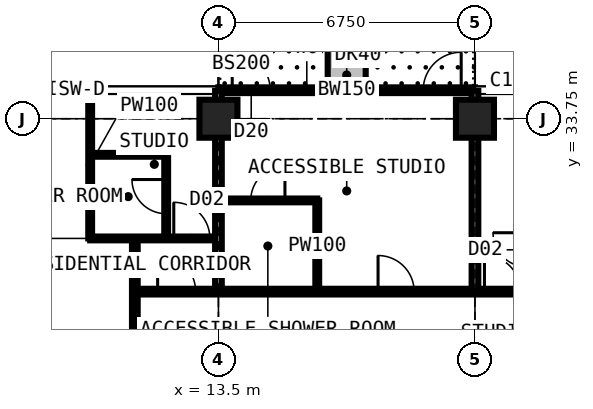
"""IFC4 building model, lengths in metres.
Left out: names, types, materials, properties, quantities, classifications, styles, units other than length and angle.
Written with IfcOpenShell. Run it as: python <this file> out.ifc"""

import sys

from ifc_helpers import new_model, si_unit, direction, frame, frame_2d, origin, origin_2d, place, context, subcontext, project, spatial, rectangle, extrude, element, fill, save


model = new_model("IFC4")
c1 = context("Model", 3, precision=1e-05, world=origin(), true_north=direction((0.0, 1.0)))
c2 = subcontext(c1, "Body", "Model", "MODEL_VIEW")
j1 = project(units=[si_unit("LENGTHUNIT", "METRE"), si_unit("PLANEANGLEUNIT", "RADIAN")], contexts=[c1])
p1 = place(None, origin())
s1 = spatial("IfcSite", under=j1, at=p1, CompositionType="ELEMENT")
p2 = place(p1, origin())
s2 = spatial("IfcBuilding", under=s1, at=p2, CompositionType="ELEMENT")
p3 = place(p2, frame((0.0, 0.0, 240.3)))
s3 = spatial("IfcBuildingStorey", under=s2, at=p3, CompositionType="ELEMENT", Elevation=240.3)
for number, where, z_axis, x_axis in (
    (1, (13.5, 33.75, 0.0), (0.0, 0.0, 1.0), (1.0, 0.0, 0.0)),
    (2, (20.25, 33.75, 0.0), (0.0, 0.0, 1.0), (1.0, 0.0, 0.0)),
):
    element("IfcColumn", number, at=place(p3, frame(where, z_axis=z_axis, x_axis=x_axis)), inside=s3, PredefinedType="COLUMN", context=c2, shape_type="SweptSolid", body=[
        extrude(rectangle(XDim=1.0, YDim=1.0, at=origin_2d()), origin(), (0.0, 0.0, 1.0), 3.6),
    ])
p4 = place(p3, frame((13.5, 34.5, 0.0), z_axis=(0.0, 0.0, 1.0), x_axis=(1.0, 0.0, 0.0)))
e3 = element("IfcWall", 3, at=p4, inside=s3, PredefinedType="SOLIDWALL", context=c2, shape_type="SweptSolid", body=[
    extrude(rectangle(XDim=6.75, YDim=0.15, at=frame_2d((3.375, 0.0))), origin(), (0.0, 0.0, 1.0), 3.375),
])
p5 = place(p4, frame((0.363, 0.0, 0.0)))
e4 = element("IfcOpeningElement", 4, at=p5, cuts=e3, PredefinedType="OPENING", context=c2, shape_type="SweptSolid", body=[
    extrude(rectangle(XDim=1.0, YDim=2.2, at=frame_2d((0.5, 1.1))), frame((0.0, 0.085, 0.0), z_axis=(0.0, -1.0, 0.0), x_axis=(1.0, 0.0, 0.0)), (0.0, 0.0, 1.0), 0.17),
])
p6 = place(p4, frame((1.725, 0.0, 0.9)))
e5 = element("IfcOpeningElement", 5, at=p6, cuts=e3, PredefinedType="OPENING", context=c2, shape_type="SweptSolid", body=[
    extrude(rectangle(XDim=1.2, YDim=1.8, at=frame_2d((0.6, 0.9))), frame((0.0, 0.085, 0.0), z_axis=(0.0, -1.0, 0.0), x_axis=(1.0, 0.0, 0.0)), (0.0, 0.0, 1.0), 0.17),
])
p7 = place(p4, frame((5.387, 0.0, 0.0)))
e6 = element("IfcOpeningElement", 6, at=p7, cuts=e3, PredefinedType="OPENING", context=c2, shape_type="SweptSolid", body=[
    extrude(rectangle(XDim=1.0, YDim=2.2, at=frame_2d((0.5, 1.1))), frame((0.0, 0.085, 0.0), z_axis=(0.0, -1.0, 0.0), x_axis=(1.0, 0.0, 0.0)), (0.0, 0.0, 1.0), 0.17),
])
p8 = place(p4, frame((3.825, 0.0, 0.9)))
e7 = element("IfcOpeningElement", 7, at=p8, cuts=e3, PredefinedType="OPENING", context=c2, shape_type="SweptSolid", body=[
    extrude(rectangle(XDim=1.2, YDim=1.8, at=frame_2d((0.6, 0.9))), frame((0.0, 0.085, 0.0), z_axis=(0.0, -1.0, 0.0), x_axis=(1.0, 0.0, 0.0)), (0.0, 0.0, 1.0), 0.17),
])
p9 = place(p3, frame((16.875, 34.6, 0.0), z_axis=(0.0, 0.0, 1.0), x_axis=(0.0, 1.0, 0.0)))
e8 = element("IfcWall", 8, at=p9, inside=s3, PredefinedType="USERDEFINED", context=c2, shape_type="SweptSolid", body=[
    extrude(rectangle(XDim=2.2, YDim=1.0, at=frame_2d((1.1, 0.0))), origin(), (0.0, 0.0, 1.0), 0.9),
])
p10 = place(p3, frame((10.125, 30.6, 0.0), z_axis=(0.0, 0.0, 1.0), x_axis=(0.0, 1.0, 0.0)))
e9 = element("IfcWall", 9, at=p10, inside=s3, PredefinedType="PARTITIONING", context=c2, shape_type="SweptSolid", body=[
    extrude(rectangle(XDim=3.884, YDim=0.1, at=frame_2d((1.942, 0.0))), origin(), (0.0, 0.0, 1.0), 3.375),
])
p11 = place(p3, frame((10.125, 30.6, 0.0), z_axis=(0.0, 0.0, 1.0), x_axis=(1.0, 0.0, 0.0)))
e10 = element("IfcWall", 10, at=p11, inside=s3, PredefinedType="PARTITIONING", context=c2, shape_type="SweptSolid", body=[
    extrude(rectangle(XDim=3.375, YDim=0.1, at=frame_2d((1.688, 0.0))), origin(), (0.0, 0.0, 1.0), 3.375),
])
p12 = place(p11, frame((2.2, 0.0, 0.0)))
e11 = element("IfcOpeningElement", 11, at=p12, cuts=e10, PredefinedType="OPENING", context=c2, shape_type="SweptSolid", body=[
    extrude(rectangle(XDim=0.95, YDim=2.2, at=frame_2d((0.475, 1.1))), frame((0.0, 0.06, 0.0), z_axis=(0.0, -1.0, 0.0), x_axis=(1.0, 0.0, 0.0)), (0.0, 0.0, 1.0), 0.12),
])
p13 = place(p3, frame((10.125, 32.8, 0.0), z_axis=(0.0, 0.0, 1.0), x_axis=(1.0, 0.0, 0.0)))
e12 = element("IfcWall", 12, at=p13, inside=s3, PredefinedType="PARTITIONING", context=c2, shape_type="SweptSolid", body=[
    extrude(rectangle(XDim=2.0, YDim=0.1, at=frame_2d((1.0, 0.0))), origin(), (0.0, 0.0, 1.0), 3.375),
])
p14 = place(p3, frame((11.3, 11.3, 0.0), z_axis=(0.0, 0.0, 1.0), x_axis=(0.0, 1.0, 0.0)))
e13 = element("IfcWall", 13, at=p14, inside=s3, PredefinedType="PARTITIONING", context=c2, shape_type="SweptSolid", body=[
    extrude(rectangle(XDim=19.3, YDim=0.15, at=frame_2d((9.65, 0.0))), origin(), (0.0, 0.0, 1.0), 3.375),
])
p15 = place(p14, frame((13.525, 0.0, 0.0)))
e14 = element("IfcOpeningElement", 14, at=p15, cuts=e13, PredefinedType="OPENING", context=c2, shape_type="SweptSolid", body=[
    extrude(rectangle(XDim=1.0, YDim=2.2, at=frame_2d((0.5, 1.1))), frame((0.0, 0.085, 0.0), z_axis=(0.0, -1.0, 0.0), x_axis=(1.0, 0.0, 0.0)), (0.0, 0.0, 1.0), 0.17),
])
p16 = place(p14, frame((10.438, 0.0, 0.0)))
e15 = element("IfcOpeningElement", 15, at=p16, cuts=e13, PredefinedType="OPENING", context=c2, shape_type="SweptSolid", body=[
    extrude(rectangle(XDim=1.0, YDim=2.2, at=frame_2d((0.5, 1.1))), frame((0.0, 0.085, 0.0), z_axis=(0.0, -1.0, 0.0), x_axis=(1.0, 0.0, 0.0)), (0.0, 0.0, 1.0), 0.17),
])
p17 = place(p3, frame((11.3, 29.2, 0.0), z_axis=(0.0, 0.0, 1.0), x_axis=(1.0, 0.0, 0.0)))
e16 = element("IfcWall", 16, at=p17, inside=s3, PredefinedType="PARTITIONING", context=c2, shape_type="SweptSolid", body=[
    extrude(rectangle(XDim=19.809, YDim=0.15, at=frame_2d((9.904, 0.0))), origin(), (0.0, 0.0, 1.0), 3.375),
])
p18 = place(p17, frame((14.625, 0.0, 0.0)))
e17 = element("IfcOpeningElement", 17, at=p18, cuts=e16, PredefinedType="OPENING", context=c2, shape_type="SweptSolid", body=[
    extrude(rectangle(XDim=1.0, YDim=2.2, at=frame_2d((0.5, 1.1))), frame((0.0, 0.085, 0.0), z_axis=(0.0, -1.0, 0.0), x_axis=(1.0, 0.0, 0.0)), (0.0, 0.0, 1.0), 0.17),
])
p19 = place(p17, frame((6.4, 0.0, 0.0)))
e18 = element("IfcOpeningElement", 18, at=p19, cuts=e16, PredefinedType="OPENING", context=c2, shape_type="SweptSolid", body=[
    extrude(rectangle(XDim=0.95, YDim=2.2, at=frame_2d((0.475, 1.1))), frame((0.0, 0.085, 0.0), z_axis=(0.0, -1.0, 0.0), x_axis=(1.0, 0.0, 0.0)), (0.0, 0.0, 1.0), 0.17),
])
p20 = place(p17, frame((9.2, 0.0, 0.0)))
e19 = element("IfcOpeningElement", 19, at=p20, cuts=e16, PredefinedType="OPENING", context=c2, shape_type="SweptSolid", body=[
    extrude(rectangle(XDim=0.95, YDim=2.2, at=frame_2d((0.475, 1.1))), frame((0.0, 0.085, 0.0), z_axis=(0.0, -1.0, 0.0), x_axis=(1.0, 0.0, 0.0)), (0.0, 0.0, 1.0), 0.17),
])
p21 = place(p17, frame((0.6, 0.0, 0.0)))
e20 = element("IfcOpeningElement", 20, at=p21, cuts=e16, PredefinedType="OPENING", context=c2, shape_type="SweptSolid", body=[
    extrude(rectangle(XDim=1.0, YDim=2.2, at=frame_2d((0.5, 1.1))), frame((0.0, 0.085, 0.0), z_axis=(0.0, -1.0, 0.0), x_axis=(1.0, 0.0, 0.0)), (0.0, 0.0, 1.0), 0.17),
])
p22 = place(p3, frame((12.125, 30.6, 0.0), z_axis=(0.0, 0.0, 1.0), x_axis=(0.0, 1.0, 0.0)))
e21 = element("IfcWall", 21, at=p22, inside=s3, PredefinedType="PARTITIONING", context=c2, shape_type="SweptSolid", body=[
    extrude(rectangle(XDim=2.2, YDim=0.1, at=frame_2d((1.1, 0.0))), origin(), (0.0, 0.0, 1.0), 3.375),
])
p23 = place(p22, frame((0.65, 0.0, 0.0)))
e22 = element("IfcOpeningElement", 22, at=p23, cuts=e21, PredefinedType="OPENING", context=c2, shape_type="SweptSolid", body=[
    extrude(rectangle(XDim=0.9, YDim=2.2, at=frame_2d((0.45, 1.1))), frame((0.0, 0.06, 0.0), z_axis=(0.0, -1.0, 0.0), x_axis=(1.0, 0.0, 0.0)), (0.0, 0.0, 1.0), 0.12),
])
p24 = place(p3, frame((13.5, 29.2, 0.0), z_axis=(0.0, 0.0, 1.0), x_axis=(0.0, 1.0, 0.0)))
e23 = element("IfcWall", 23, at=p24, inside=s3, PredefinedType="PARTITIONING", context=c2, shape_type="SweptSolid", body=[
    extrude(rectangle(XDim=5.284, YDim=0.175, at=frame_2d((2.642, 0.0))), origin(), (0.0, 0.0, 1.0), 2.877),
])
p25 = place(p3, frame((13.5, 31.6, 0.0), z_axis=(0.0, 0.0, 1.0), x_axis=(1.0, 0.0, 0.0)))
e24 = element("IfcWall", 24, at=p25, inside=s3, PredefinedType="PARTITIONING", context=c2, shape_type="SweptSolid", body=[
    extrude(rectangle(XDim=2.6, YDim=0.1, at=frame_2d((1.3, 0.0))), origin(), (0.0, 0.0, 1.0), 3.375),
])
p26 = place(p25, frame((0.85, 0.0, 0.0)))
e25 = element("IfcOpeningElement", 25, at=p26, cuts=e24, PredefinedType="OPENING", context=c2, shape_type="SweptSolid", body=[
    extrude(rectangle(XDim=0.9, YDim=2.2, at=frame_2d((0.45, 1.1))), frame((0.0, 0.06, 0.0), z_axis=(0.0, -1.0, 0.0), x_axis=(1.0, 0.0, 0.0)), (0.0, 0.0, 1.0), 0.12),
])
p27 = place(p3, frame((16.1, 29.2, 0.0), z_axis=(0.0, 0.0, 1.0), x_axis=(0.0, 1.0, 0.0)))
e26 = element("IfcWall", 26, at=p27, inside=s3, PredefinedType="PARTITIONING", context=c2, shape_type="SweptSolid", body=[
    extrude(rectangle(XDim=2.4, YDim=0.1, at=frame_2d((1.2, 0.0))), origin(), (0.0, 0.0, 1.0), 3.375),
])
p28 = place(p3, frame((20.25, 29.2, 0.0), z_axis=(0.0, 0.0, 1.0), x_axis=(0.0, 1.0, 0.0)))
e27 = element("IfcWall", 27, at=p28, inside=s3, PredefinedType="PARTITIONING", context=c2, shape_type="SweptSolid", body=[
    extrude(rectangle(XDim=5.284, YDim=0.175, at=frame_2d((2.642, 0.0))), origin(), (0.0, 0.0, 1.0), 2.877),
])
p29 = place(p5, origin())
e28 = element("IfcDoor", 28, at=p29, inside=s3, OperationType="SINGLE_SWING_LEFT", PredefinedType="DOOR", context=c2, shape_type="SweptSolid", body=[
    extrude(rectangle(XDim=1.0, YDim=2.2, at=frame_2d((0.5, 1.1))), frame((0.0, 0.025, 0.0), z_axis=(0.0, -1.0, 0.0), x_axis=(1.0, 0.0, 0.0)), (0.0, 0.0, 1.0), 0.05),
])
fill(e4, e28)
p30 = place(p6, origin())
e29 = element("IfcWindow", 29, at=p30, inside=s3, PartitioningType="SINGLE_PANEL", PredefinedType="WINDOW", context=c2, shape_type="SweptSolid", body=[
    extrude(rectangle(XDim=1.2, YDim=1.8, at=frame_2d((0.6, 0.9))), frame((0.0, 0.03, 0.0), z_axis=(0.0, -1.0, 0.0), x_axis=(1.0, 0.0, 0.0)), (0.0, 0.0, 1.0), 0.06),
])
fill(e5, e29)
p31 = place(p7, origin())
e30 = element("IfcDoor", 30, at=p31, inside=s3, OperationType="SINGLE_SWING_RIGHT", PredefinedType="DOOR", context=c2, shape_type="SweptSolid", body=[
    extrude(rectangle(XDim=1.0, YDim=2.2, at=frame_2d((0.5, 1.1))), frame((0.0, 0.025, 0.0), z_axis=(0.0, -1.0, 0.0), x_axis=(1.0, 0.0, 0.0)), (0.0, 0.0, 1.0), 0.05),
])
fill(e6, e30)
p32 = place(p8, origin())
e31 = element("IfcWindow", 31, at=p32, inside=s3, PartitioningType="SINGLE_PANEL", PredefinedType="WINDOW", context=c2, shape_type="SweptSolid", body=[
    extrude(rectangle(XDim=1.2, YDim=1.8, at=frame_2d((0.6, 0.9))), frame((0.0, 0.03, 0.0), z_axis=(0.0, -1.0, 0.0), x_axis=(1.0, 0.0, 0.0)), (0.0, 0.0, 1.0), 0.06),
])
fill(e7, e31)
p33 = place(p19, origin())
e32 = element("IfcDoor", 32, at=p33, inside=s3, OperationType="SINGLE_SWING_LEFT", PredefinedType="DOOR", context=c2, shape_type="SweptSolid", body=[
    extrude(rectangle(XDim=0.95, YDim=2.2, at=frame_2d((0.475, 1.1))), frame((0.0, 0.025, 0.0), z_axis=(0.0, -1.0, 0.0), x_axis=(1.0, 0.0, 0.0)), (0.0, 0.0, 1.0), 0.05),
])
fill(e18, e32)
p34 = place(p26, origin())
e33 = element("IfcDoor", 33, at=p34, inside=s3, OperationType="SINGLE_SWING_RIGHT", PredefinedType="DOOR", context=c2, shape_type="SweptSolid", body=[
    extrude(rectangle(XDim=0.9, YDim=2.2, at=frame_2d((0.45, 1.1))), frame((0.0, 0.025, 0.0), z_axis=(0.0, -1.0, 0.0), x_axis=(1.0, 0.0, 0.0)), (0.0, 0.0, 1.0), 0.05),
])
fill(e25, e33)
p35 = place(p12, origin())
e34 = element("IfcDoor", 34, at=p35, inside=s3, OperationType="SINGLE_SWING_LEFT", PredefinedType="DOOR", context=c2, shape_type="SweptSolid", body=[
    extrude(rectangle(XDim=0.95, YDim=2.2, at=frame_2d((0.475, 1.1))), frame((0.0, 0.025, 0.0), z_axis=(0.0, -1.0, 0.0), x_axis=(1.0, 0.0, 0.0)), (0.0, 0.0, 1.0), 0.05),
])
fill(e11, e34)
p36 = place(p23, origin())
e35 = element("IfcDoor", 35, at=p36, inside=s3, OperationType="SINGLE_SWING_RIGHT", PredefinedType="DOOR", context=c2, shape_type="SweptSolid", body=[
    extrude(rectangle(XDim=0.9, YDim=2.2, at=frame_2d((0.45, 1.1))), frame((0.0, 0.025, 0.0), z_axis=(0.0, -1.0, 0.0), x_axis=(1.0, 0.0, 0.0)), (0.0, 0.0, 1.0), 0.05),
])
fill(e22, e35)
p37 = place(p20, origin())
e36 = element("IfcDoor", 36, at=p37, inside=s3, OperationType="SINGLE_SWING_LEFT", PredefinedType="DOOR", context=c2, shape_type="SweptSolid", body=[
    extrude(rectangle(XDim=0.95, YDim=2.2, at=frame_2d((0.475, 1.1))), frame((0.0, 0.025, 0.0), z_axis=(0.0, -1.0, 0.0), x_axis=(1.0, 0.0, 0.0)), (0.0, 0.0, 1.0), 0.05),
])
fill(e19, e36)
p38 = place(p21, origin())
e37 = element("IfcDoor", 37, at=p38, inside=s3, OperationType="SINGLE_SWING_LEFT", PredefinedType="DOOR", context=c2, shape_type="SweptSolid", body=[
    extrude(rectangle(XDim=1.0, YDim=2.2, at=frame_2d((0.5, 1.1))), frame((0.0, 0.025, 0.0), z_axis=(0.0, -1.0, 0.0), x_axis=(1.0, 0.0, 0.0)), (0.0, 0.0, 1.0), 0.05),
])
fill(e20, e37)
save(model, sys.argv[1])
